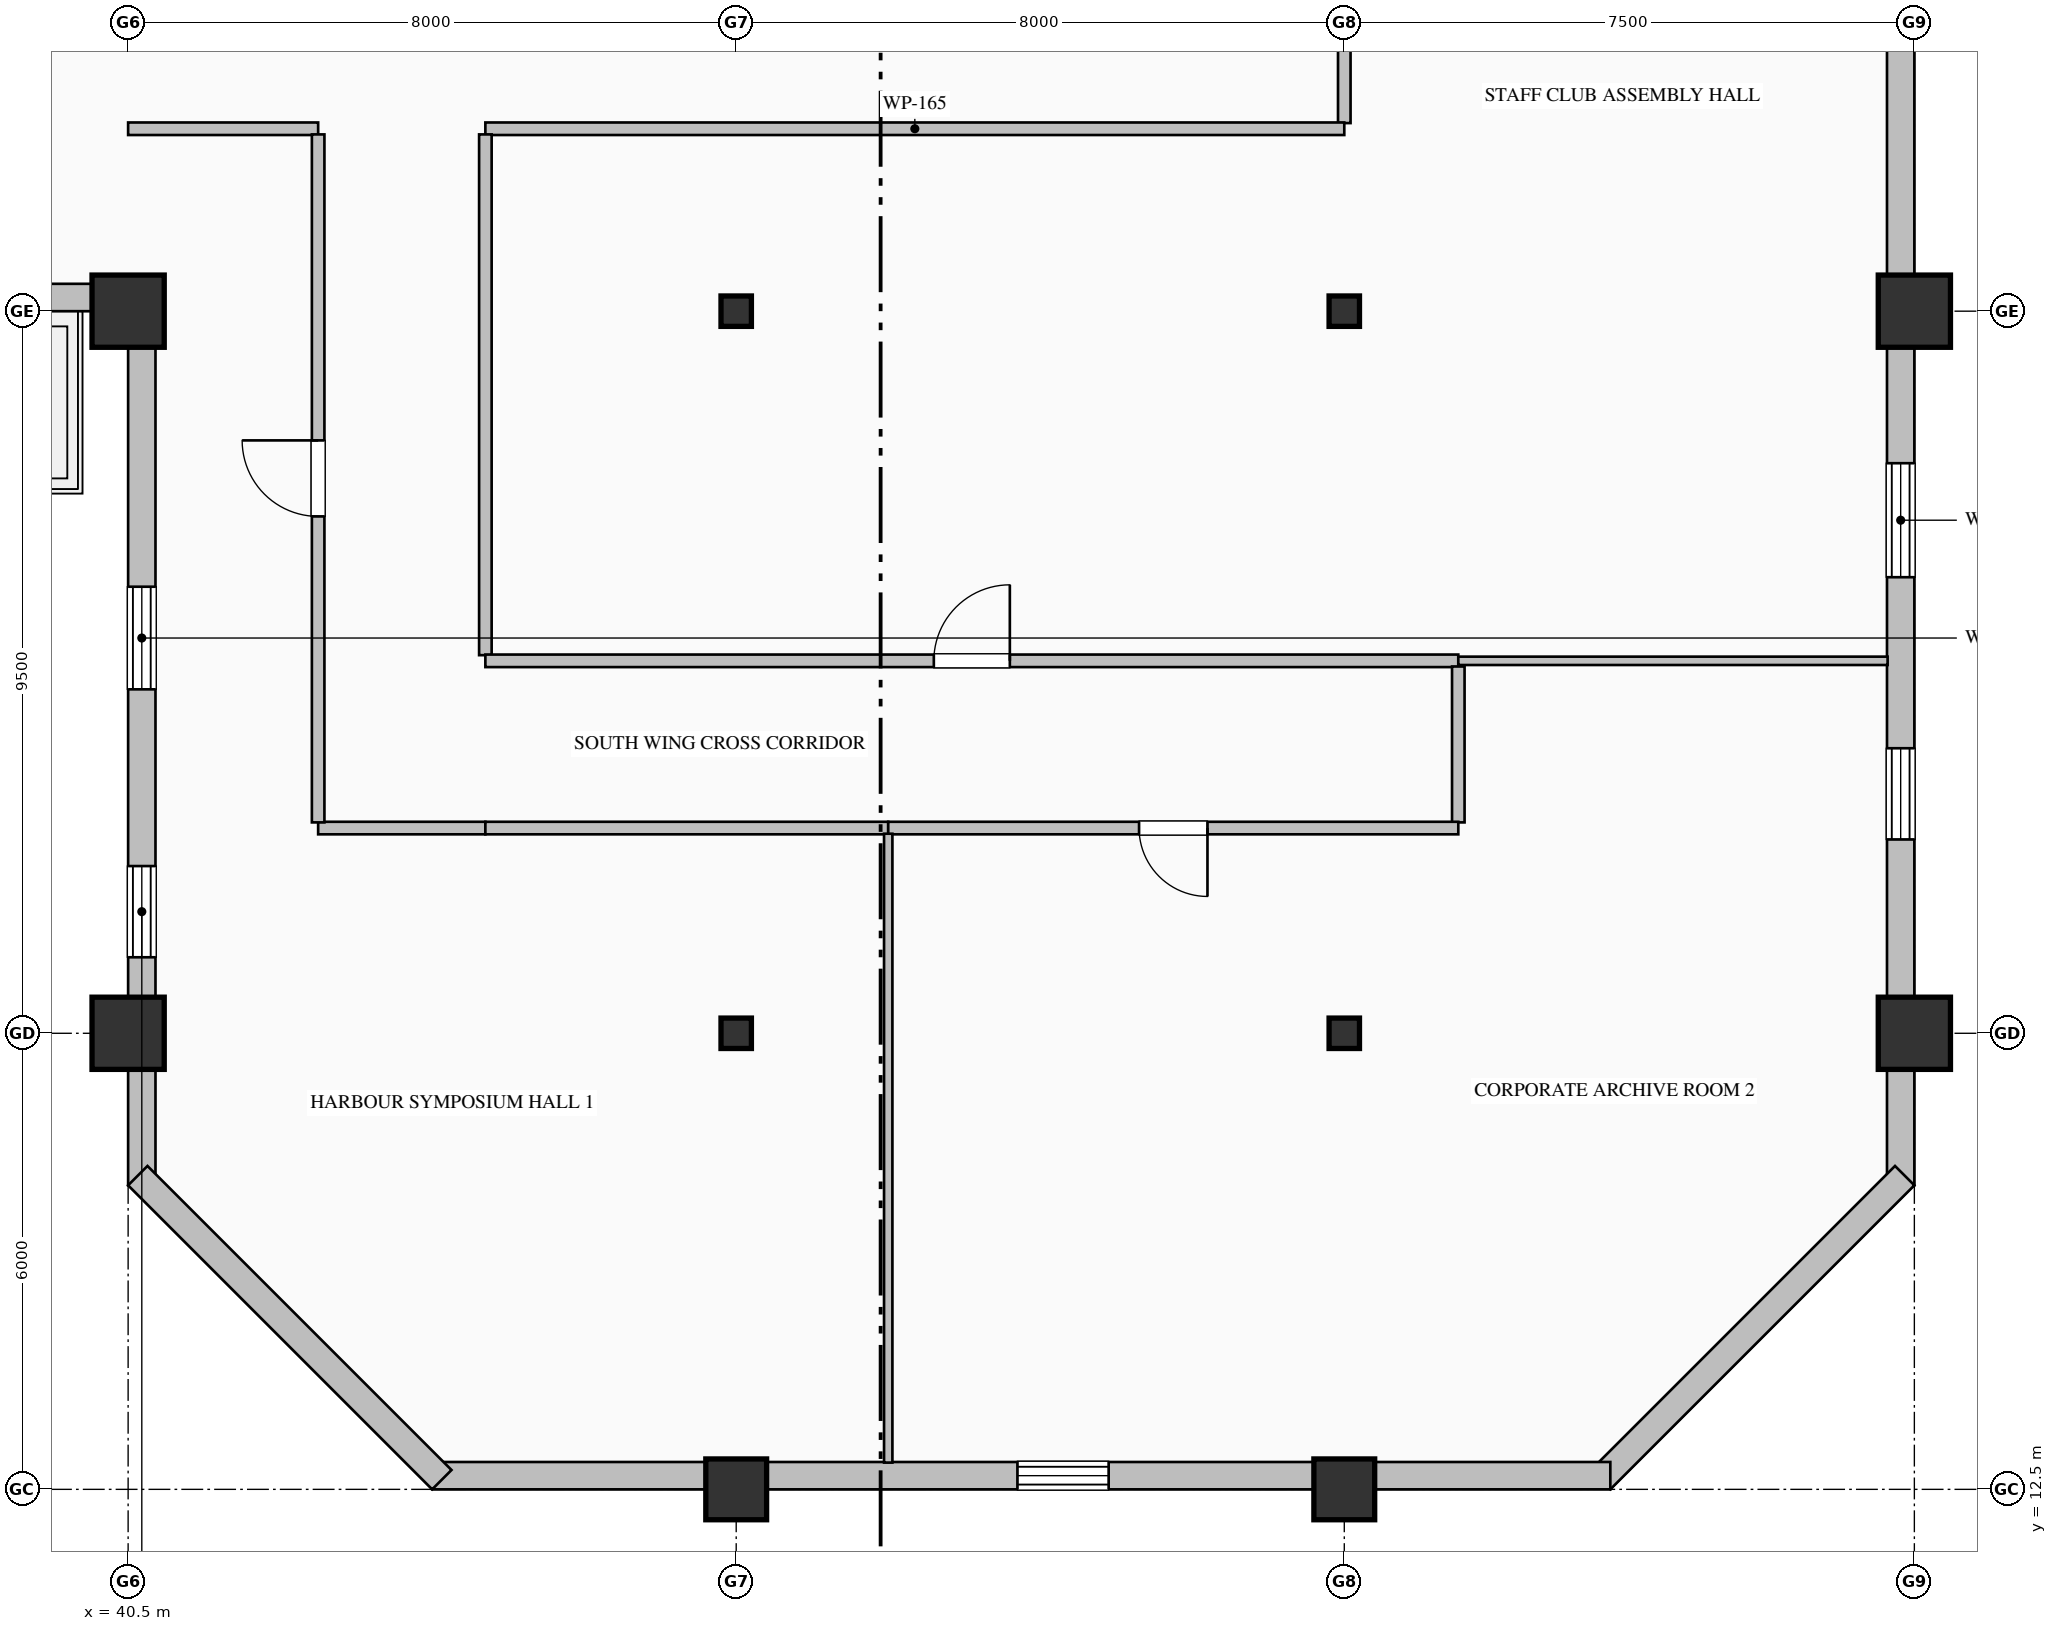
"""IFC4 building model, lengths in metres.
Left out: names, types, materials, properties, quantities, classifications, styles, units other than length and angle.
Written with IfcOpenShell. Run it as: python <this file> out.ifc"""

import sys

from ifc_helpers import new_model, si_unit, direction, frame, frame_2d, origin, origin_2d, place, context, subcontext, project, spatial, rectangle, hollow_rectangle, i_section, extrude, element, fill, save


model = new_model("IFC4")
c1 = context("Model", 3, precision=1e-05, world=origin(), true_north=direction((0.0, 1.0)))
c2 = subcontext(c1, "Body", "Model", "MODEL_VIEW")
j1 = project(units=[si_unit("LENGTHUNIT", "METRE"), si_unit("PLANEANGLEUNIT", "RADIAN")], contexts=[c1])
p1 = place(None, origin())
s1 = spatial("IfcSite", under=j1, at=p1, CompositionType="ELEMENT")
p2 = place(p1, origin())
s2 = spatial("IfcBuilding", under=s1, at=p2, CompositionType="ELEMENT")
p3 = place(p2, frame((0.0, 0.0, 237.8)))
s3 = spatial("IfcBuildingStorey", under=s2, at=p3, CompositionType="ELEMENT", Elevation=237.8)
for number, where, z_axis, x_axis in (
    (1, (40.5, 18.5, 0.0), (0.0, 0.0, 1.0), (1.0, 0.0, 0.0)),
    (2, (40.5, 28.0, 0.0), (0.0, 0.0, 1.0), (1.0, 0.0, 0.0)),
):
    element("IfcColumn", number, at=place(p3, frame(where, z_axis=z_axis, x_axis=x_axis)), inside=s3, PredefinedType="COLUMN", context=c2, shape_type="SweptSolid", body=[
        extrude(hollow_rectangle(XDim=0.95, YDim=0.95, WallThickness=0.036, at=origin_2d()), origin(), (0.0, 0.0, 1.0), 4.0),
    ])
p4 = place(p3, frame((48.5, 12.5, 0.0), z_axis=(0.0, 0.0, 1.0), x_axis=(1.0, 0.0, 0.0)))
e3 = element("IfcColumn", 3, at=p4, inside=s3, PredefinedType="COLUMN", context=c2, shape_type="SweptSolid", body=[
    extrude(hollow_rectangle(XDim=0.8, YDim=0.8, WallThickness=0.032, at=origin_2d()), origin(), (0.0, 0.0, 1.0), 4.0),
])
for number, where, z_axis, x_axis in (
    (4, (48.5, 18.5, 0.0), (0.0, 0.0, 1.0), (1.0, 0.0, 0.0)),
    (5, (48.5, 28.0, 0.0), (0.0, 0.0, 1.0), (1.0, 0.0, 0.0)),
):
    element("IfcColumn", number, at=place(p3, frame(where, z_axis=z_axis, x_axis=x_axis)), inside=s3, PredefinedType="COLUMN", context=c2, shape_type="SweptSolid", body=[
        extrude(i_section(OverallWidth=0.4, OverallDepth=0.4, WebThickness=0.013, FlangeThickness=0.021, FilletRadius=0.022, at=origin_2d()), origin(), (0.0, 0.0, 1.0), 4.0),
    ])
p5 = place(p3, frame((56.5, 12.5, 0.0), z_axis=(0.0, 0.0, 1.0), x_axis=(1.0, 0.0, 0.0)))
e6 = element("IfcColumn", 6, at=p5, inside=s3, PredefinedType="COLUMN", context=c2, shape_type="SweptSolid", body=[
    extrude(hollow_rectangle(XDim=0.8, YDim=0.8, WallThickness=0.032, at=origin_2d()), origin(), (0.0, 0.0, 1.0), 4.0),
])
for number, where, z_axis, x_axis in (
    (7, (56.5, 18.5, 0.0), (0.0, 0.0, 1.0), (1.0, 0.0, 0.0)),
    (8, (56.5, 28.0, 0.0), (0.0, 0.0, 1.0), (1.0, 0.0, 0.0)),
):
    element("IfcColumn", number, at=place(p3, frame(where, z_axis=z_axis, x_axis=x_axis)), inside=s3, PredefinedType="COLUMN", context=c2, shape_type="SweptSolid", body=[
        extrude(i_section(OverallWidth=0.4, OverallDepth=0.4, WebThickness=0.013, FlangeThickness=0.021, FilletRadius=0.022, at=origin_2d()), origin(), (0.0, 0.0, 1.0), 4.0),
    ])
for number, where, z_axis, x_axis in (
    (9, (64.0, 18.5, 0.0), (0.0, 0.0, 1.0), (1.0, 0.0, 0.0)),
    (10, (64.0, 28.0, 0.0), (0.0, 0.0, 1.0), (1.0, 0.0, 0.0)),
):
    element("IfcColumn", number, at=place(p3, frame(where, z_axis=z_axis, x_axis=x_axis)), inside=s3, PredefinedType="COLUMN", context=c2, shape_type="SweptSolid", body=[
        extrude(hollow_rectangle(XDim=0.95, YDim=0.95, WallThickness=0.036, at=origin_2d()), origin(), (0.0, 0.0, 1.0), 4.0),
    ])
p6 = place(p3, frame((40.68, 16.5, 0.0), z_axis=(0.0, 0.0, 1.0), x_axis=(0.0, 1.0, 0.0)))
e11 = element("IfcWall", 11, at=p6, inside=s3, PredefinedType="SOLIDWALL", context=c2, shape_type="SweptSolid", body=[
    extrude(rectangle(XDim=11.86, YDim=0.36, at=frame_2d((5.93, 0.0))), origin(), (0.0, 0.0, 1.0), 3.187),
])
p7 = place(p6, frame((3.0, 0.0, 0.9)))
e12 = element("IfcOpeningElement", 12, at=p7, cuts=e11, PredefinedType="OPENING", context=c2, shape_type="SweptSolid", body=[
    extrude(rectangle(XDim=1.2, YDim=1.85, at=frame_2d((0.6, 0.925))), frame((0.0, 0.19, 0.0), z_axis=(0.0, -1.0, 0.0), x_axis=(1.0, 0.0, 0.0)), (0.0, 0.0, 1.0), 0.38),
])
p8 = place(p6, frame((6.525, 0.0, 0.9)))
e13 = element("IfcOpeningElement", 13, at=p8, cuts=e11, PredefinedType="OPENING", context=c2, shape_type="SweptSolid", body=[
    extrude(rectangle(XDim=1.35, YDim=1.85, at=frame_2d((0.675, 0.925))), frame((0.0, 0.19, 0.0), z_axis=(0.0, -1.0, 0.0), x_axis=(1.0, 0.0, 0.0)), (0.0, 0.0, 1.0), 0.38),
])
p9 = place(p3, frame((40.52, 28.18, 0.0), z_axis=(0.0, 0.0, 1.0), x_axis=(-1.0, 0.0, 0.0)))
e14 = element("IfcWall", 14, at=p9, inside=s3, PredefinedType="SOLIDWALL", context=c2, shape_type="SweptSolid", body=[
    extrude(rectangle(XDim=27.52, YDim=0.36, at=frame_2d((13.76, 0.0))), origin(), (0.0, 0.0, 1.0), 3.187),
])
p10 = place(p9, frame((13.725, 0.0, 0.9)))
e15 = element("IfcOpeningElement", 15, at=p10, cuts=e14, PredefinedType="OPENING", context=c2, shape_type="SweptSolid", body=[
    extrude(rectangle(XDim=1.35, YDim=1.85, at=frame_2d((0.675, 0.925))), frame((0.0, 0.19, 0.0), z_axis=(0.0, -1.0, 0.0), x_axis=(1.0, 0.0, 0.0)), (0.0, 0.0, 1.0), 0.38),
])
p11 = place(p9, frame((17.4, 0.0, 0.7)))
e16 = element("IfcOpeningElement", 16, at=p11, cuts=e14, PredefinedType="OPENING", context=c2, shape_type="SweptSolid", body=[
    extrude(rectangle(XDim=1.2, YDim=1.85, at=frame_2d((0.6, 0.925))), frame((0.0, 0.19, 0.0), z_axis=(0.0, -1.0, 0.0), x_axis=(1.0, 0.0, 0.0)), (0.0, 0.0, 1.0), 0.38),
])
p12 = place(p9, frame((21.0, 0.0, 0.9)))
e17 = element("IfcOpeningElement", 17, at=p12, cuts=e14, PredefinedType="OPENING", context=c2, shape_type="SweptSolid", body=[
    extrude(rectangle(XDim=1.2, YDim=1.85, at=frame_2d((0.6, 0.925))), frame((0.0, 0.19, 0.0), z_axis=(0.0, -1.0, 0.0), x_axis=(1.0, 0.0, 0.0)), (0.0, 0.0, 1.0), 0.38),
])
p13 = place(p9, frame((11.395, 0.0, 0.0)))
e18 = element("IfcOpeningElement", 18, at=p13, cuts=e14, PredefinedType="OPENING", context=c2, shape_type="SweptSolid", body=[
    extrude(rectangle(XDim=1.25, YDim=2.25, at=frame_2d((0.625, 1.125))), frame((0.0, 0.19, 0.0), z_axis=(0.0, -1.0, 0.0), x_axis=(1.0, 0.0, 0.0)), (0.0, 0.0, 1.0), 0.38),
])
p14 = place(p3, frame((63.82, 36.05, 0.0), z_axis=(0.0, 0.0, 1.0), x_axis=(0.0, -1.0, 0.0)))
e19 = element("IfcWall", 19, at=p14, inside=s3, PredefinedType="SOLIDWALL", context=c2, shape_type="SweptSolid", body=[
    extrude(rectangle(XDim=19.55, YDim=0.36, at=frame_2d((9.775, 0.0))), origin(), (0.0, 0.0, 1.0), 3.325),
])
p15 = place(p14, frame((3.0, 0.0, 0.9)))
e20 = element("IfcOpeningElement", 20, at=p15, cuts=e19, PredefinedType="OPENING", context=c2, shape_type="SweptSolid", body=[
    extrude(rectangle(XDim=1.2, YDim=1.85, at=frame_2d((0.6, 0.925))), frame((0.0, 0.19, 0.0), z_axis=(0.0, -1.0, 0.0), x_axis=(1.0, 0.0, 0.0)), (0.0, 0.0, 1.0), 0.38),
])
p16 = place(p14, frame((10.05, 0.0, 0.7)))
e21 = element("IfcOpeningElement", 21, at=p16, cuts=e19, PredefinedType="OPENING", context=c2, shape_type="SweptSolid", body=[
    extrude(rectangle(XDim=1.5, YDim=2.4, at=frame_2d((0.75, 1.2))), frame((0.0, 0.19, 0.0), z_axis=(0.0, -1.0, 0.0), x_axis=(1.0, 0.0, 0.0)), (0.0, 0.0, 1.0), 0.38),
])
p17 = place(p14, frame((13.8, 0.0, 0.9)))
e22 = element("IfcOpeningElement", 22, at=p17, cuts=e19, PredefinedType="OPENING", context=c2, shape_type="SweptSolid", body=[
    extrude(rectangle(XDim=1.2, YDim=1.85, at=frame_2d((0.6, 0.925))), frame((0.0, 0.19, 0.0), z_axis=(0.0, -1.0, 0.0), x_axis=(1.0, 0.0, 0.0)), (0.0, 0.0, 1.0), 0.38),
])
p18 = place(p3, frame((63.873, 16.627, 0.0), z_axis=(0.0, 0.0, 1.0), x_axis=(-0.707106781187, -0.707106781187, 0.0)))
e23 = element("IfcWall", 23, at=p18, inside=s3, PredefinedType="SOLIDWALL", context=c2, shape_type="SweptSolid", body=[
    extrude(rectangle(XDim=5.657, YDim=0.36, at=frame_2d((2.828, 0.0))), origin(), (0.0, 0.0, 1.0), 3.775),
])
p19 = place(p3, frame((60.0, 12.68, 0.0), z_axis=(0.0, 0.0, 1.0), x_axis=(-1.0, 0.0, 0.0)))
e24 = element("IfcWall", 24, at=p19, inside=s3, PredefinedType="SOLIDWALL", context=c2, shape_type="SweptSolid", body=[
    extrude(rectangle(XDim=15.5, YDim=0.36, at=frame_2d((7.75, 0.0))), origin(), (0.0, 0.0, 1.0), 3.325),
])
p20 = place(p19, frame((6.6, 0.0, 0.9)))
e25 = element("IfcOpeningElement", 25, at=p20, cuts=e24, PredefinedType="OPENING", context=c2, shape_type="SweptSolid", body=[
    extrude(rectangle(XDim=1.2, YDim=1.85, at=frame_2d((0.6, 0.925))), frame((0.0, 0.19, 0.0), z_axis=(0.0, -1.0, 0.0), x_axis=(1.0, 0.0, 0.0)), (0.0, 0.0, 1.0), 0.38),
])
p21 = place(p3, frame((44.627, 12.627, 0.0), z_axis=(0.0, 0.0, 1.0), x_axis=(-0.707106781187, 0.707106781187, 0.0)))
e26 = element("IfcWall", 26, at=p21, inside=s3, PredefinedType="SOLIDWALL", context=c2, shape_type="SweptSolid", body=[
    extrude(rectangle(XDim=5.657, YDim=0.36, at=frame_2d((2.828, 0.0))), origin(), (0.0, 0.0, 1.0), 3.775),
])
p22 = place(p3, frame((56.5, 36.0, 0.0), z_axis=(0.0, 0.0, 1.0), x_axis=(0.0, -1.0, 0.0)))
e27 = element("IfcWall", 27, at=p22, inside=s3, PredefinedType="PARTITIONING", context=c2, shape_type="SweptSolid", body=[
    extrude(rectangle(XDim=5.525, YDim=0.165, at=frame_2d((2.763, 0.0))), origin(), (0.0, 0.0, 1.0), 3.179),
])
p23 = place(p3, frame((56.5, 30.4, 0.0), z_axis=(0.0, 0.0, 1.0), x_axis=(-1.0, 0.0, 0.0)))
e28 = element("IfcWall", 28, at=p23, inside=s3, PredefinedType="PARTITIONING", context=c2, shape_type="SweptSolid", body=[
    extrude(rectangle(XDim=11.3, YDim=0.165, at=frame_2d((5.65, 0.0))), origin(), (0.0, 0.0, 1.0), 3.775),
])
p24 = place(p3, frame((43.0, 30.4, 0.0), z_axis=(0.0, 0.0, 1.0), x_axis=(-1.0, 0.0, 0.0)))
e29 = element("IfcWall", 29, at=p24, inside=s3, PredefinedType="PARTITIONING", context=c2, shape_type="SweptSolid", body=[
    extrude(rectangle(XDim=2.5, YDim=0.165, at=frame_2d((1.25, 0.0))), origin(), (0.0, 0.0, 1.0), 3.775),
])
p25 = place(p3, frame((45.2, 30.325, 0.0), z_axis=(0.0, 0.0, 1.0), x_axis=(0.0, -1.0, 0.0)))
e30 = element("IfcWall", 30, at=p25, inside=s3, PredefinedType="PARTITIONING", context=c2, shape_type="SweptSolid", body=[
    extrude(rectangle(XDim=6.851, YDim=0.165, at=frame_2d((3.425, 0.0))), origin(), (0.0, 0.0, 1.0), 3.775),
])
p26 = place(p3, frame((45.2, 21.2, 0.0), z_axis=(0.0, 0.0, 1.0), x_axis=(-1.0, 0.0, 0.0)))
e31 = element("IfcWall", 31, at=p26, inside=s3, PredefinedType="PARTITIONING", context=c2, shape_type="SweptSolid", body=[
    extrude(rectangle(XDim=2.2, YDim=0.165, at=frame_2d((1.1, 0.0))), origin(), (0.0, 0.0, 1.0), 3.775),
])
p27 = place(p3, frame((43.0, 21.274, 0.0), z_axis=(0.0, 0.0, 1.0), x_axis=(0.0, 1.0, 0.0)))
e32 = element("IfcWall", 32, at=p27, inside=s3, PredefinedType="PARTITIONING", context=c2, shape_type="SweptSolid", body=[
    extrude(rectangle(XDim=9.051, YDim=0.165, at=frame_2d((4.525, 0.0))), origin(), (0.0, 0.0, 1.0), 3.775),
])
p28 = place(p27, frame((4.025, 0.0, 0.0)))
e33 = element("IfcOpeningElement", 33, at=p28, cuts=e32, PredefinedType="OPENING", context=c2, shape_type="SweptSolid", body=[
    extrude(rectangle(XDim=1.0, YDim=2.15, at=frame_2d((0.5, 1.075))), frame((0.0, 0.093, 0.0), z_axis=(0.0, -1.0, 0.0), x_axis=(1.0, 0.0, 0.0)), (0.0, 0.0, 1.0), 0.185),
])
p29 = place(p3, frame((45.2, 23.4, 0.0), z_axis=(0.0, 0.0, 1.0), x_axis=(1.0, 0.0, 0.0)))
e34 = element("IfcWall", 34, at=p29, inside=s3, PredefinedType="PARTITIONING", context=c2, shape_type="SweptSolid", body=[
    extrude(rectangle(XDim=12.8, YDim=0.165, at=frame_2d((6.4, 0.0))), origin(), (0.0, 0.0, 1.0), 3.467),
])
p30 = place(p29, frame((5.9, 0.0, 0.0)))
e35 = element("IfcOpeningElement", 35, at=p30, cuts=e34, PredefinedType="OPENING", context=c2, shape_type="SweptSolid", body=[
    extrude(rectangle(XDim=1.0, YDim=2.15, at=frame_2d((0.5, 1.075))), frame((0.0, 0.093, 0.0), z_axis=(0.0, -1.0, 0.0), x_axis=(1.0, 0.0, 0.0)), (0.0, 0.0, 1.0), 0.185),
])
p31 = place(p3, frame((50.5, 21.2, 0.0), z_axis=(0.0, 0.0, 1.0), x_axis=(-1.0, 0.0, 0.0)))
e36 = element("IfcWall", 36, at=p31, inside=s3, PredefinedType="PARTITIONING", context=c2, shape_type="SweptSolid", body=[
    extrude(rectangle(XDim=5.3, YDim=0.165, at=frame_2d((2.65, 0.0))), origin(), (0.0, 0.0, 1.0), 3.775),
])
p32 = place(p3, frame((58.0, 23.325, 0.0), z_axis=(0.0, 0.0, 1.0), x_axis=(0.0, -1.0, 0.0)))
e37 = element("IfcWall", 37, at=p32, inside=s3, PredefinedType="PARTITIONING", context=c2, shape_type="SweptSolid", body=[
    extrude(rectangle(XDim=2.051, YDim=0.165, at=frame_2d((1.025, 0.0))), origin(), (0.0, 0.0, 1.0), 3.775),
])
p33 = place(p3, frame((58.0, 21.2, 0.0), z_axis=(0.0, 0.0, 1.0), x_axis=(-1.0, 0.0, 0.0)))
e38 = element("IfcWall", 38, at=p33, inside=s3, PredefinedType="PARTITIONING", context=c2, shape_type="SweptSolid", body=[
    extrude(rectangle(XDim=7.5, YDim=0.165, at=frame_2d((3.75, 0.0))), origin(), (0.0, 0.0, 1.0), 3.775),
])
p34 = place(p33, frame((3.3, 0.0, 0.0)))
e39 = element("IfcOpeningElement", 39, at=p34, cuts=e38, PredefinedType="OPENING", context=c2, shape_type="SweptSolid", body=[
    extrude(rectangle(XDim=0.9, YDim=2.15, at=frame_2d((0.45, 1.075))), frame((0.0, 0.093, 0.0), z_axis=(0.0, -1.0, 0.0), x_axis=(1.0, 0.0, 0.0)), (0.0, 0.0, 1.0), 0.185),
])
p35 = place(p3, frame((63.648, 23.4, 0.0), z_axis=(0.0, 0.0, 1.0), x_axis=(-1.0, 0.0, 0.0)))
e40 = element("IfcWall", 40, at=p35, inside=s3, PredefinedType="MOVABLE", context=c2, shape_type="SweptSolid", body=[
    extrude(rectangle(XDim=5.648, YDim=0.11, at=frame_2d((2.824, 0.0))), origin(), (0.0, 0.0, 1.0), 3.775),
])
p36 = place(p3, frame((50.5, 21.125, 0.0), z_axis=(0.0, 0.0, 1.0), x_axis=(0.0, -1.0, 0.0)))
e41 = element("IfcWall", 41, at=p36, inside=s3, PredefinedType="MOVABLE", context=c2, shape_type="SweptSolid", body=[
    extrude(rectangle(XDim=8.273, YDim=0.11, at=frame_2d((4.137, 0.0))), origin(), (0.0, 0.0, 1.0), 3.775),
])
p37 = place(p7, origin())
e42 = element("IfcWindow", 42, at=p37, inside=s3, PartitioningType="DOUBLE_PANEL_VERTICAL", PredefinedType="WINDOW", context=c2, shape_type="SweptSolid", body=[
    extrude(rectangle(XDim=1.2, YDim=1.85, at=frame_2d((0.6, 0.925))), frame((0.0, 0.15, 0.0), z_axis=(0.0, -1.0, 0.0), x_axis=(1.0, 0.0, 0.0)), (0.0, 0.0, 1.0), 0.06),
])
fill(e12, e42)
p38 = place(p8, origin())
e43 = element("IfcWindow", 43, at=p38, inside=s3, PartitioningType="DOUBLE_PANEL_VERTICAL", PredefinedType="WINDOW", context=c2, shape_type="SweptSolid", body=[
    extrude(rectangle(XDim=1.35, YDim=1.85, at=frame_2d((0.675, 0.925))), frame((0.0, 0.15, 0.0), z_axis=(0.0, -1.0, 0.0), x_axis=(1.0, 0.0, 0.0)), (0.0, 0.0, 1.0), 0.06),
])
fill(e13, e43)
p39 = place(p16, origin())
e44 = element("IfcWindow", 44, at=p39, inside=s3, PartitioningType="DOUBLE_PANEL_HORIZONTAL", PredefinedType="WINDOW", context=c2, shape_type="SweptSolid", body=[
    extrude(rectangle(XDim=1.5, YDim=2.4, at=frame_2d((0.75, 1.2))), frame((0.0, 0.15, 0.0), z_axis=(0.0, -1.0, 0.0), x_axis=(1.0, 0.0, 0.0)), (0.0, 0.0, 1.0), 0.06),
])
fill(e21, e44)
p40 = place(p17, origin())
e45 = element("IfcWindow", 45, at=p40, inside=s3, PartitioningType="DOUBLE_PANEL_VERTICAL", PredefinedType="WINDOW", context=c2, shape_type="SweptSolid", body=[
    extrude(rectangle(XDim=1.2, YDim=1.85, at=frame_2d((0.6, 0.925))), frame((0.0, 0.15, 0.0), z_axis=(0.0, -1.0, 0.0), x_axis=(1.0, 0.0, 0.0)), (0.0, 0.0, 1.0), 0.06),
])
fill(e22, e45)
p41 = place(p20, origin())
e46 = element("IfcWindow", 46, at=p41, inside=s3, PartitioningType="DOUBLE_PANEL_VERTICAL", PredefinedType="WINDOW", context=c2, shape_type="SweptSolid", body=[
    extrude(rectangle(XDim=1.2, YDim=1.85, at=frame_2d((0.6, 0.925))), frame((0.0, 0.15, 0.0), z_axis=(0.0, -1.0, 0.0), x_axis=(1.0, 0.0, 0.0)), (0.0, 0.0, 1.0), 0.06),
])
fill(e25, e46)
p42 = place(p30, origin())
e47 = element("IfcDoor", 47, at=p42, inside=s3, OperationType="SINGLE_SWING_RIGHT", PredefinedType="DOOR", context=c2, shape_type="SweptSolid", body=[
    extrude(rectangle(XDim=1.0, YDim=2.15, at=frame_2d((0.5, 1.075))), frame((0.0, 0.025, 0.0), z_axis=(0.0, -1.0, 0.0), x_axis=(1.0, 0.0, 0.0)), (0.0, 0.0, 1.0), 0.05),
])
fill(e35, e47)
p43 = place(p28, origin())
e48 = element("IfcDoor", 48, at=p43, inside=s3, OperationType="SINGLE_SWING_RIGHT", PredefinedType="DOOR", context=c2, shape_type="SweptSolid", body=[
    extrude(rectangle(XDim=1.0, YDim=2.15, at=frame_2d((0.5, 1.075))), frame((0.0, 0.025, 0.0), z_axis=(0.0, -1.0, 0.0), x_axis=(1.0, 0.0, 0.0)), (0.0, 0.0, 1.0), 0.05),
])
fill(e33, e48)
p44 = place(p34, origin())
e49 = element("IfcDoor", 49, at=p44, inside=s3, OperationType="SINGLE_SWING_LEFT", PredefinedType="DOOR", context=c2, shape_type="SweptSolid", body=[
    extrude(rectangle(XDim=0.9, YDim=2.15, at=frame_2d((0.45, 1.075))), frame((0.0, 0.025, 0.0), z_axis=(0.0, -1.0, 0.0), x_axis=(1.0, 0.0, 0.0)), (0.0, 0.0, 1.0), 0.05),
])
fill(e39, e49)
save(model, sys.argv[1])
